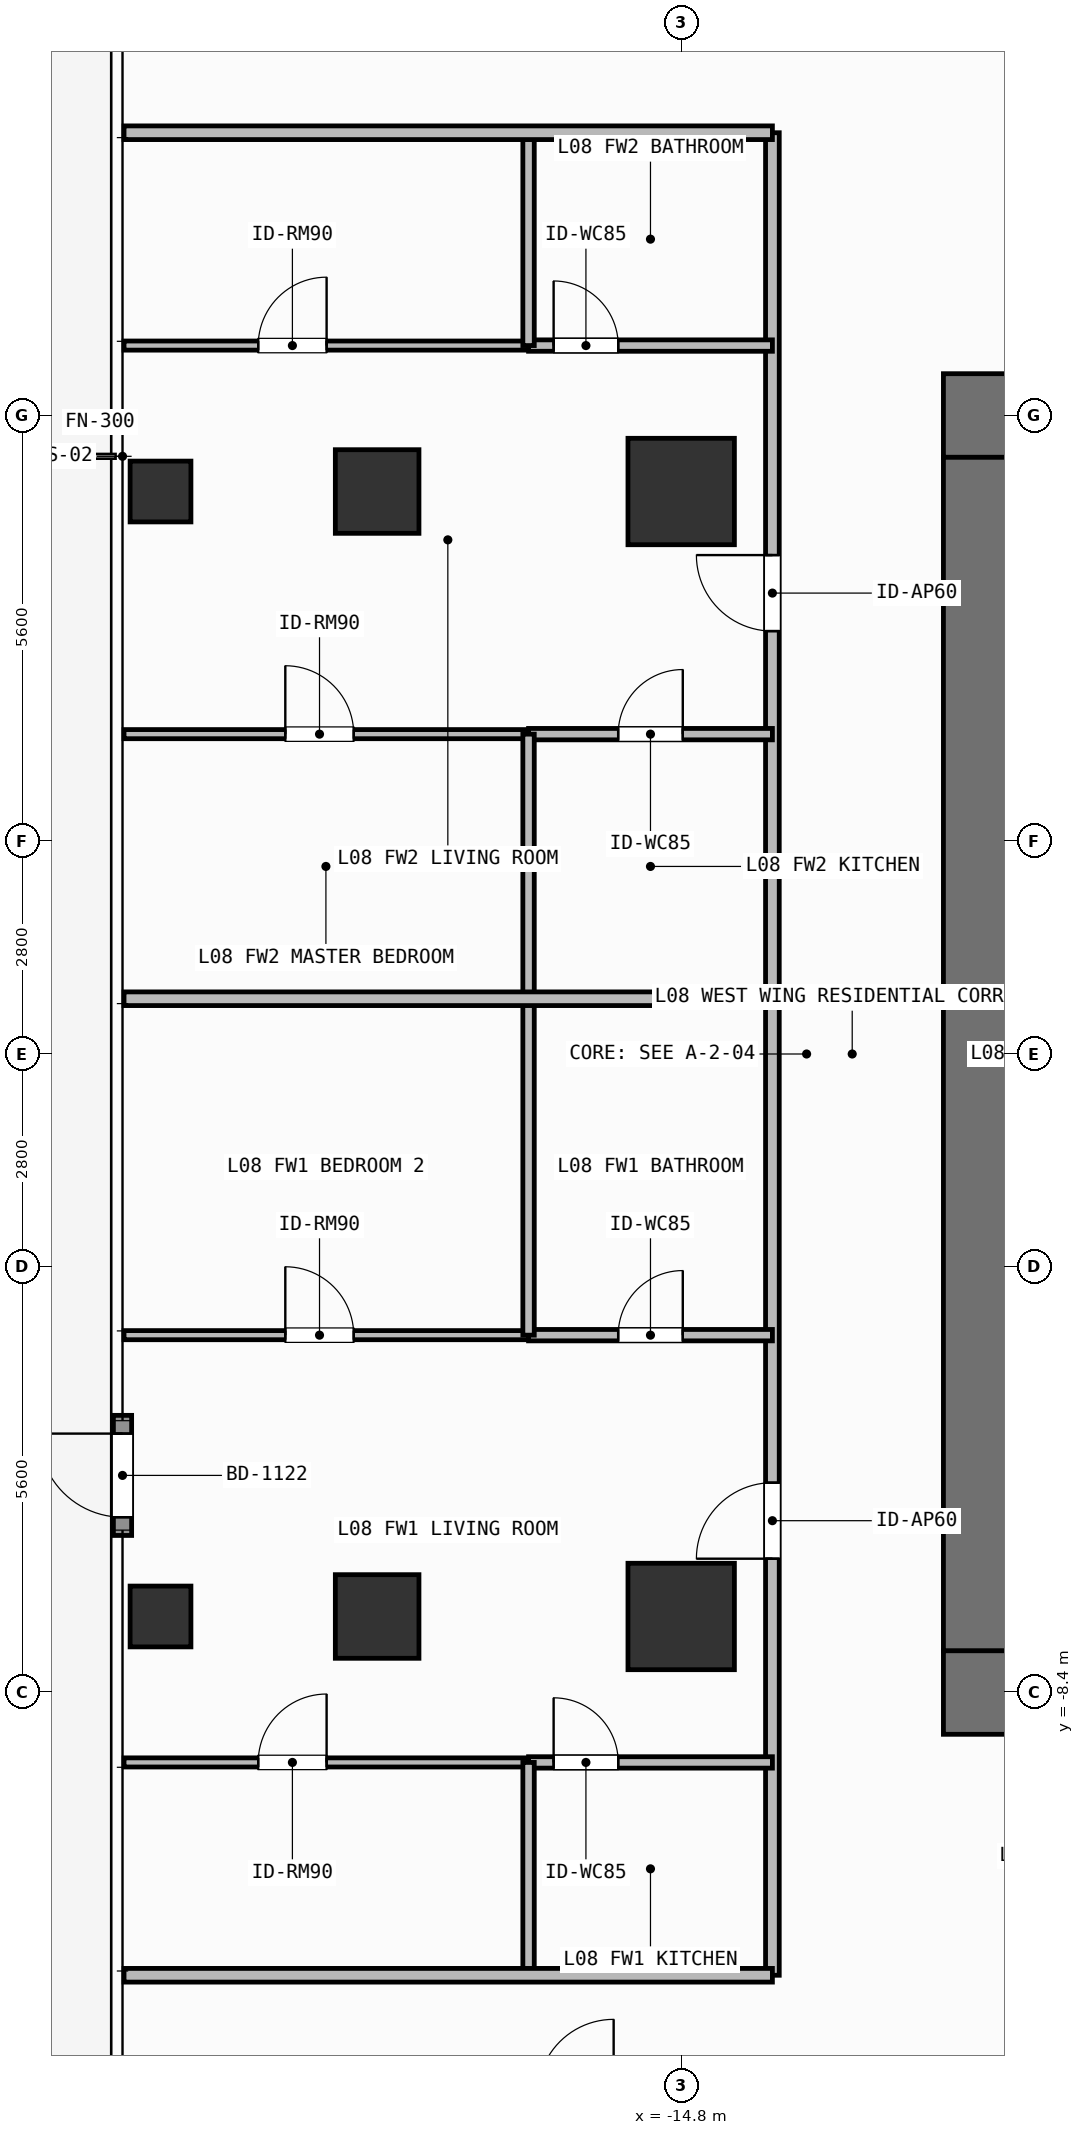
"""IFC4 building model, lengths in metres.
Left out: names, types, materials, properties, quantities, classifications, styles, units other than length and angle.
Written with IfcOpenShell. Run it as: python <this file> out.ifc"""

import sys

from ifc_helpers import new_model, si_unit, direction, frame, frame_2d, origin, origin_2d, place, context, subcontext, project, spatial, rectangle, hollow_rectangle, extrude, element, fill, save


model = new_model("IFC4")
c1 = context("Model", 3, precision=1e-05, world=origin(), true_north=direction((0.0, 1.0)))
c2 = subcontext(c1, "Body", "Model", "MODEL_VIEW")
j1 = project(units=[si_unit("LENGTHUNIT", "METRE"), si_unit("PLANEANGLEUNIT", "RADIAN")], contexts=[c1])
p1 = place(None, origin())
s1 = spatial("IfcSite", under=j1, at=p1, CompositionType="ELEMENT")
p2 = place(p1, origin())
s2 = spatial("IfcBuilding", under=s1, at=p2, CompositionType="ELEMENT")
p3 = place(p2, frame((0.0, 0.0, 30.6)))
s3 = spatial("IfcBuildingStorey", under=s2, at=p3, CompositionType="ELEMENT", Elevation=30.6)
for number, where, z_axis, x_axis in (
    (1, (-11.35, -8.4, 0.0), (0.0, 0.0, 1.0), (1.0, 0.0, 0.0)),
    (2, (-11.35, 8.4, 0.0), (0.0, 0.0, 1.0), (1.0, 0.0, 0.0)),
):
    element("IfcWall", number, at=place(p3, frame(where, z_axis=z_axis, x_axis=x_axis)), inside=s3, PredefinedType="SHEAR", context=c2, shape_type="SweptSolid", body=[
        extrude(rectangle(XDim=1.65, YDim=1.1, at=frame_2d((0.825, 0.0))), origin(), (0.0, 0.0, 1.0), 3.9),
    ])
p4 = place(p3, frame((-10.8, -7.85, 0.0), z_axis=(0.0, 0.0, 1.0), x_axis=(0.0, 1.0, 0.0)))
e3 = element("IfcWall", 3, at=p4, inside=s3, PredefinedType="SHEAR", context=c2, shape_type="SweptSolid", body=[
    extrude(rectangle(XDim=15.7, YDim=1.1, at=frame_2d((7.85, 0.0))), origin(), (0.0, 0.0, 1.0), 3.9),
])
for number, where, z_axis, x_axis in (
    (4, (-14.8, -7.4, 0.0), (0.0, 0.0, 1.0), (1.0, 0.0, 0.0)),
    (5, (-14.8, 7.4, 0.0), (0.0, 0.0, 1.0), (1.0, 0.0, 0.0)),
):
    element("IfcColumn", number, at=place(p3, frame(where, z_axis=z_axis, x_axis=x_axis)), inside=s3, PredefinedType="COLUMN", context=c2, shape_type="SweptSolid", body=[
        extrude(rectangle(XDim=1.4, YDim=1.4, at=origin_2d()), origin(), (0.0, 0.0, 1.0), 3.9),
    ])
for number, where, z_axis, x_axis in (
    (6, (-18.8, -7.4, 0.0), (0.0, 0.0, 1.0), (1.0, 0.0, 0.0)),
    (7, (-18.8, 7.4, 0.0), (0.0, 0.0, 1.0), (1.0, 0.0, 0.0)),
):
    element("IfcColumn", number, at=place(p3, frame(where, z_axis=z_axis, x_axis=x_axis)), inside=s3, PredefinedType="COLUMN", context=c2, shape_type="SweptSolid", body=[
        extrude(rectangle(XDim=1.1, YDim=1.1, at=origin_2d()), origin(), (0.0, 0.0, 1.0), 3.9),
    ])
for number, where, z_axis, x_axis in (
    (8, (-21.65, -7.4, 0.0), (0.0, 0.0, 1.0), (1.0, 0.0, 0.0)),
    (9, (-21.65, 7.4, 0.0), (0.0, 0.0, 1.0), (1.0, 0.0, 0.0)),
):
    element("IfcColumn", number, at=place(p3, frame(where, z_axis=z_axis, x_axis=x_axis)), inside=s3, PredefinedType="COLUMN", context=c2, shape_type="SweptSolid", body=[
        extrude(hollow_rectangle(XDim=0.8, YDim=0.8, WallThickness=0.036, at=origin_2d()), origin(), (0.0, 0.0, 1.0), 3.9),
    ])
p5 = place(p3, frame((-22.15, -6.334, 0.0), z_axis=(0.0, 0.0, 1.0), x_axis=(0.0, 1.0, 0.0)))
e10 = element("IfcWall", 10, at=p5, inside=s3, PredefinedType="SOLIDWALL", context=c2, shape_type="SweptSolid", body=[
    extrude(rectangle(XDim=1.58, YDim=0.24, at=frame_2d((0.79, 0.0))), origin(), (0.0, 0.0, 1.0), 3.68),
])
p6 = place(p5, frame((0.24, 0.0, 0.0)))
e11 = element("IfcOpeningElement", 11, at=p6, cuts=e10, PredefinedType="OPENING", context=c2, shape_type="SweptSolid", body=[
    extrude(rectangle(XDim=1.1, YDim=2.2, at=frame_2d((0.55, 1.1))), frame((0.0, 0.13, 0.0), z_axis=(0.0, -1.0, 0.0), x_axis=(1.0, 0.0, 0.0)), (0.0, 0.0, 1.0), 0.26),
])
p7 = place(p3, frame((-13.6, -12.12, 0.0), z_axis=(0.0, 0.0, 1.0), x_axis=(0.0, 1.0, 0.0)))
e12 = element("IfcWall", 12, at=p7, inside=s3, PredefinedType="PARTITIONING", context=c2, shape_type="SweptSolid", body=[
    extrude(rectangle(XDim=12.847, YDim=0.18, at=frame_2d((6.424, 0.0))), origin(), (0.0, 0.0, 1.0), 3.68),
])
p8 = place(p7, frame((5.48, 0.0, 0.0)))
e13 = element("IfcOpeningElement", 13, at=p8, cuts=e12, PredefinedType="OPENING", context=c2, shape_type="SweptSolid", body=[
    extrude(rectangle(XDim=1.0, YDim=2.2, at=frame_2d((0.5, 1.1))), frame((0.0, 0.1, 0.0), z_axis=(0.0, -1.0, 0.0), x_axis=(1.0, 0.0, 0.0)), (0.0, 0.0, 1.0), 0.2),
])
p9 = place(p3, frame((-16.808, -3.699, 0.0), z_axis=(0.0, 0.0, 1.0), x_axis=(1.0, 0.0, 0.0)))
e14 = element("IfcWall", 14, at=p9, inside=s3, PredefinedType="PARTITIONING", context=c2, shape_type="SweptSolid", body=[
    extrude(rectangle(XDim=3.208, YDim=0.15, at=frame_2d((1.604, 0.0))), origin(), (0.0, 0.0, 1.0), 3.68),
])
p10 = place(p9, frame((1.179, 0.0, 0.0)))
e15 = element("IfcOpeningElement", 15, at=p10, cuts=e14, PredefinedType="OPENING", context=c2, shape_type="SweptSolid", body=[
    extrude(rectangle(XDim=0.85, YDim=2.1, at=frame_2d((0.425, 1.05))), frame((0.0, 0.085, 0.0), z_axis=(0.0, -1.0, 0.0), x_axis=(1.0, 0.0, 0.0)), (0.0, 0.0, 1.0), 0.17),
])
p11 = place(p3, frame((-16.808, -9.32, 0.0), z_axis=(0.0, 0.0, 1.0), x_axis=(1.0, 0.0, 0.0)))
e16 = element("IfcWall", 16, at=p11, inside=s3, PredefinedType="PARTITIONING", context=c2, shape_type="SweptSolid", body=[
    extrude(rectangle(XDim=3.208, YDim=0.15, at=frame_2d((1.604, 0.0))), origin(), (0.0, 0.0, 1.0), 3.68),
])
p12 = place(p11, frame((0.33, 0.0, 0.0)))
e17 = element("IfcOpeningElement", 17, at=p12, cuts=e16, PredefinedType="OPENING", context=c2, shape_type="SweptSolid", body=[
    extrude(rectangle(XDim=0.85, YDim=2.1, at=frame_2d((0.425, 1.05))), frame((0.0, 0.085, 0.0), z_axis=(0.0, -1.0, 0.0), x_axis=(1.0, 0.0, 0.0)), (0.0, 0.0, 1.0), 0.17),
])
p13 = place(p3, frame((-22.13, -9.32, 0.0), z_axis=(0.0, 0.0, 1.0), x_axis=(1.0, 0.0, 0.0)))
e18 = element("IfcWall", 18, at=p13, inside=s3, PredefinedType="PARTITIONING", context=c2, shape_type="SweptSolid", body=[
    extrude(rectangle(XDim=5.322, YDim=0.12, at=frame_2d((2.661, 0.0))), origin(), (0.0, 0.0, 1.0), 3.68),
])
p14 = place(p13, frame((1.765, 0.0, 0.0)))
e19 = element("IfcOpeningElement", 19, at=p14, cuts=e18, PredefinedType="OPENING", context=c2, shape_type="SweptSolid", body=[
    extrude(rectangle(XDim=0.9, YDim=2.1, at=frame_2d((0.45, 1.05))), frame((0.0, 0.07, 0.0), z_axis=(0.0, -1.0, 0.0), x_axis=(1.0, 0.0, 0.0)), (0.0, 0.0, 1.0), 0.14),
])
p15 = place(p3, frame((-22.13, -3.699, 0.0), z_axis=(0.0, 0.0, 1.0), x_axis=(1.0, 0.0, 0.0)))
e20 = element("IfcWall", 20, at=p15, inside=s3, PredefinedType="PARTITIONING", context=c2, shape_type="SweptSolid", body=[
    extrude(rectangle(XDim=5.322, YDim=0.12, at=frame_2d((2.661, 0.0))), origin(), (0.0, 0.0, 1.0), 3.68),
])
p16 = place(p15, frame((2.122, 0.0, 0.0)))
e21 = element("IfcOpeningElement", 21, at=p16, cuts=e20, PredefinedType="OPENING", context=c2, shape_type="SweptSolid", body=[
    extrude(rectangle(XDim=0.9, YDim=2.1, at=frame_2d((0.45, 1.05))), frame((0.0, 0.07, 0.0), z_axis=(0.0, -1.0, 0.0), x_axis=(1.0, 0.0, 0.0)), (0.0, 0.0, 1.0), 0.14),
])
p17 = place(p3, frame((-13.6, 0.727, 0.0), z_axis=(0.0, 0.0, 1.0), x_axis=(0.0, 1.0, 0.0)))
e22 = element("IfcWall", 22, at=p17, inside=s3, PredefinedType="PARTITIONING", context=c2, shape_type="SweptSolid", body=[
    extrude(rectangle(XDim=11.393, YDim=0.18, at=frame_2d((5.697, 0.0))), origin(), (0.0, 0.0, 1.0), 3.68),
])
p18 = place(p17, frame((4.837, 0.0, 0.0)))
e23 = element("IfcOpeningElement", 23, at=p18, cuts=e22, PredefinedType="OPENING", context=c2, shape_type="SweptSolid", body=[
    extrude(rectangle(XDim=1.0, YDim=2.2, at=frame_2d((0.5, 1.1))), frame((0.0, 0.1, 0.0), z_axis=(0.0, -1.0, 0.0), x_axis=(1.0, 0.0, 0.0)), (0.0, 0.0, 1.0), 0.2),
])
p19 = place(p3, frame((-16.808, 9.32, 0.0), z_axis=(0.0, 0.0, 1.0), x_axis=(1.0, 0.0, 0.0)))
e24 = element("IfcWall", 24, at=p19, inside=s3, PredefinedType="PARTITIONING", context=c2, shape_type="SweptSolid", body=[
    extrude(rectangle(XDim=3.208, YDim=0.15, at=frame_2d((1.604, 0.0))), origin(), (0.0, 0.0, 1.0), 3.68),
])
p20 = place(p19, frame((0.33, 0.0, 0.0)))
e25 = element("IfcOpeningElement", 25, at=p20, cuts=e24, PredefinedType="OPENING", context=c2, shape_type="SweptSolid", body=[
    extrude(rectangle(XDim=0.85, YDim=2.1, at=frame_2d((0.425, 1.05))), frame((0.0, 0.085, 0.0), z_axis=(0.0, -1.0, 0.0), x_axis=(1.0, 0.0, 0.0)), (0.0, 0.0, 1.0), 0.17),
])
p21 = place(p3, frame((-16.808, 4.208, 0.0), z_axis=(0.0, 0.0, 1.0), x_axis=(1.0, 0.0, 0.0)))
e26 = element("IfcWall", 26, at=p21, inside=s3, PredefinedType="PARTITIONING", context=c2, shape_type="SweptSolid", body=[
    extrude(rectangle(XDim=3.208, YDim=0.15, at=frame_2d((1.604, 0.0))), origin(), (0.0, 0.0, 1.0), 3.68),
])
p22 = place(p21, frame((1.179, 0.0, 0.0)))
e27 = element("IfcOpeningElement", 27, at=p22, cuts=e26, PredefinedType="OPENING", context=c2, shape_type="SweptSolid", body=[
    extrude(rectangle(XDim=0.85, YDim=2.1, at=frame_2d((0.425, 1.05))), frame((0.0, 0.085, 0.0), z_axis=(0.0, -1.0, 0.0), x_axis=(1.0, 0.0, 0.0)), (0.0, 0.0, 1.0), 0.17),
])
p23 = place(p3, frame((-22.13, 4.208, 0.0), z_axis=(0.0, 0.0, 1.0), x_axis=(1.0, 0.0, 0.0)))
e28 = element("IfcWall", 28, at=p23, inside=s3, PredefinedType="PARTITIONING", context=c2, shape_type="SweptSolid", body=[
    extrude(rectangle(XDim=5.322, YDim=0.12, at=frame_2d((2.661, 0.0))), origin(), (0.0, 0.0, 1.0), 3.68),
])
p24 = place(p23, frame((2.122, 0.0, 0.0)))
e29 = element("IfcOpeningElement", 29, at=p24, cuts=e28, PredefinedType="OPENING", context=c2, shape_type="SweptSolid", body=[
    extrude(rectangle(XDim=0.9, YDim=2.1, at=frame_2d((0.45, 1.05))), frame((0.0, 0.07, 0.0), z_axis=(0.0, -1.0, 0.0), x_axis=(1.0, 0.0, 0.0)), (0.0, 0.0, 1.0), 0.14),
])
p25 = place(p3, frame((-22.13, 9.32, 0.0), z_axis=(0.0, 0.0, 1.0), x_axis=(1.0, 0.0, 0.0)))
e30 = element("IfcWall", 30, at=p25, inside=s3, PredefinedType="PARTITIONING", context=c2, shape_type="SweptSolid", body=[
    extrude(rectangle(XDim=5.322, YDim=0.12, at=frame_2d((2.661, 0.0))), origin(), (0.0, 0.0, 1.0), 3.68),
])
p26 = place(p25, frame((1.765, 0.0, 0.0)))
e31 = element("IfcOpeningElement", 31, at=p26, cuts=e30, PredefinedType="OPENING", context=c2, shape_type="SweptSolid", body=[
    extrude(rectangle(XDim=0.9, YDim=2.1, at=frame_2d((0.45, 1.05))), frame((0.0, 0.07, 0.0), z_axis=(0.0, -1.0, 0.0), x_axis=(1.0, 0.0, 0.0)), (0.0, 0.0, 1.0), 0.14),
])
p27 = place(p3, frame((-16.808, -12.12, 0.0), z_axis=(0.0, 0.0, 1.0), x_axis=(0.0, 1.0, 0.0)))
e32 = element("IfcWall", 32, at=p27, inside=s3, PredefinedType="PARTITIONING", context=c2, shape_type="SweptSolid", body=[
    extrude(rectangle(XDim=2.8, YDim=0.15, at=frame_2d((1.4, 0.0))), origin(), (0.0, 0.0, 1.0), 3.68),
])
p28 = place(p3, frame((-16.808, -3.699, 0.0), z_axis=(0.0, 0.0, 1.0), x_axis=(0.0, 1.0, 0.0)))
e33 = element("IfcWall", 33, at=p28, inside=s3, PredefinedType="PARTITIONING", context=c2, shape_type="SweptSolid", body=[
    extrude(rectangle(XDim=4.426, YDim=0.15, at=frame_2d((2.213, 0.0))), origin(), (0.0, 0.0, 1.0), 3.68),
])
p29 = place(p3, frame((-16.808, 0.727, 0.0), z_axis=(0.0, 0.0, 1.0), x_axis=(0.0, 1.0, 0.0)))
e34 = element("IfcWall", 34, at=p29, inside=s3, PredefinedType="PARTITIONING", context=c2, shape_type="SweptSolid", body=[
    extrude(rectangle(XDim=3.481, YDim=0.15, at=frame_2d((1.74, 0.0))), origin(), (0.0, 0.0, 1.0), 3.68),
])
p30 = place(p3, frame((-16.808, 9.32, 0.0), z_axis=(0.0, 0.0, 1.0), x_axis=(0.0, 1.0, 0.0)))
e35 = element("IfcWall", 35, at=p30, inside=s3, PredefinedType="PARTITIONING", context=c2, shape_type="SweptSolid", body=[
    extrude(rectangle(XDim=2.8, YDim=0.15, at=frame_2d((1.4, 0.0))), origin(), (0.0, 0.0, 1.0), 3.68),
])
for number, where, z_axis, x_axis in (
    (36, (-22.13, 0.727, 0.0), (0.0, 0.0, 1.0), (1.0, 0.0, 0.0)),
    (37, (-22.13, -12.12, 0.0), (0.0, 0.0, 1.0), (1.0, 0.0, 0.0)),
    (38, (-22.13, 12.12, 0.0), (0.0, 0.0, 1.0), (1.0, 0.0, 0.0)),
):
    element("IfcWall", number, at=place(p3, frame(where, z_axis=z_axis, x_axis=x_axis)), inside=s3, PredefinedType="PARTITIONING", context=c2, shape_type="SweptSolid", body=[
        extrude(rectangle(XDim=8.53, YDim=0.18, at=frame_2d((4.265, 0.0))), origin(), (0.0, 0.0, 1.0), 3.68),
    ])
p31 = place(p6, origin())
e39 = element("IfcDoor", 39, at=p31, inside=s3, OperationType="SINGLE_SWING_RIGHT", PredefinedType="DOOR", context=c2, shape_type="SweptSolid", body=[
    extrude(rectangle(XDim=1.1, YDim=2.2, at=frame_2d((0.55, 1.1))), frame((0.0, 0.025, 0.0), z_axis=(0.0, -1.0, 0.0), x_axis=(1.0, 0.0, 0.0)), (0.0, 0.0, 1.0), 0.05),
])
fill(e11, e39)
p32 = place(p8, origin())
e40 = element("IfcDoor", 40, at=p32, inside=s3, OperationType="SINGLE_SWING_LEFT", PredefinedType="DOOR", context=c2, shape_type="SweptSolid", body=[
    extrude(rectangle(XDim=1.0, YDim=2.2, at=frame_2d((0.5, 1.1))), frame((0.0, 0.025, 0.0), z_axis=(0.0, -1.0, 0.0), x_axis=(1.0, 0.0, 0.0)), (0.0, 0.0, 1.0), 0.05),
])
fill(e13, e40)
p33 = place(p10, origin())
e41 = element("IfcDoor", 41, at=p33, inside=s3, OperationType="SINGLE_SWING_RIGHT", PredefinedType="DOOR", context=c2, shape_type="SweptSolid", body=[
    extrude(rectangle(XDim=0.85, YDim=2.1, at=frame_2d((0.425, 1.05))), frame((0.0, 0.025, 0.0), z_axis=(0.0, -1.0, 0.0), x_axis=(1.0, 0.0, 0.0)), (0.0, 0.0, 1.0), 0.05),
])
fill(e15, e41)
p34 = place(p12, origin())
e42 = element("IfcDoor", 42, at=p34, inside=s3, OperationType="SINGLE_SWING_LEFT", PredefinedType="DOOR", context=c2, shape_type="SweptSolid", body=[
    extrude(rectangle(XDim=0.85, YDim=2.1, at=frame_2d((0.425, 1.05))), frame((0.0, 0.025, 0.0), z_axis=(0.0, -1.0, 0.0), x_axis=(1.0, 0.0, 0.0)), (0.0, 0.0, 1.0), 0.05),
])
fill(e17, e42)
p35 = place(p14, origin())
e43 = element("IfcDoor", 43, at=p35, inside=s3, OperationType="SINGLE_SWING_RIGHT", PredefinedType="DOOR", context=c2, shape_type="SweptSolid", body=[
    extrude(rectangle(XDim=0.9, YDim=2.1, at=frame_2d((0.45, 1.05))), frame((0.0, 0.025, 0.0), z_axis=(0.0, -1.0, 0.0), x_axis=(1.0, 0.0, 0.0)), (0.0, 0.0, 1.0), 0.05),
])
fill(e19, e43)
p36 = place(p16, origin())
e44 = element("IfcDoor", 44, at=p36, inside=s3, OperationType="SINGLE_SWING_LEFT", PredefinedType="DOOR", context=c2, shape_type="SweptSolid", body=[
    extrude(rectangle(XDim=0.9, YDim=2.1, at=frame_2d((0.45, 1.05))), frame((0.0, 0.025, 0.0), z_axis=(0.0, -1.0, 0.0), x_axis=(1.0, 0.0, 0.0)), (0.0, 0.0, 1.0), 0.05),
])
fill(e21, e44)
p37 = place(p18, origin())
e45 = element("IfcDoor", 45, at=p37, inside=s3, OperationType="SINGLE_SWING_RIGHT", PredefinedType="DOOR", context=c2, shape_type="SweptSolid", body=[
    extrude(rectangle(XDim=1.0, YDim=2.2, at=frame_2d((0.5, 1.1))), frame((0.0, 0.025, 0.0), z_axis=(0.0, -1.0, 0.0), x_axis=(1.0, 0.0, 0.0)), (0.0, 0.0, 1.0), 0.05),
])
fill(e23, e45)
p38 = place(p20, origin())
e46 = element("IfcDoor", 46, at=p38, inside=s3, OperationType="SINGLE_SWING_LEFT", PredefinedType="DOOR", context=c2, shape_type="SweptSolid", body=[
    extrude(rectangle(XDim=0.85, YDim=2.1, at=frame_2d((0.425, 1.05))), frame((0.0, 0.025, 0.0), z_axis=(0.0, -1.0, 0.0), x_axis=(1.0, 0.0, 0.0)), (0.0, 0.0, 1.0), 0.05),
])
fill(e25, e46)
p39 = place(p22, origin())
e47 = element("IfcDoor", 47, at=p39, inside=s3, OperationType="SINGLE_SWING_RIGHT", PredefinedType="DOOR", context=c2, shape_type="SweptSolid", body=[
    extrude(rectangle(XDim=0.85, YDim=2.1, at=frame_2d((0.425, 1.05))), frame((0.0, 0.025, 0.0), z_axis=(0.0, -1.0, 0.0), x_axis=(1.0, 0.0, 0.0)), (0.0, 0.0, 1.0), 0.05),
])
fill(e27, e47)
p40 = place(p24, origin())
e48 = element("IfcDoor", 48, at=p40, inside=s3, OperationType="SINGLE_SWING_LEFT", PredefinedType="DOOR", context=c2, shape_type="SweptSolid", body=[
    extrude(rectangle(XDim=0.9, YDim=2.1, at=frame_2d((0.45, 1.05))), frame((0.0, 0.025, 0.0), z_axis=(0.0, -1.0, 0.0), x_axis=(1.0, 0.0, 0.0)), (0.0, 0.0, 1.0), 0.05),
])
fill(e29, e48)
p41 = place(p26, origin())
e49 = element("IfcDoor", 49, at=p41, inside=s3, OperationType="SINGLE_SWING_RIGHT", PredefinedType="DOOR", context=c2, shape_type="SweptSolid", body=[
    extrude(rectangle(XDim=0.9, YDim=2.1, at=frame_2d((0.45, 1.05))), frame((0.0, 0.025, 0.0), z_axis=(0.0, -1.0, 0.0), x_axis=(1.0, 0.0, 0.0)), (0.0, 0.0, 1.0), 0.05),
])
fill(e31, e49)
save(model, sys.argv[1])
